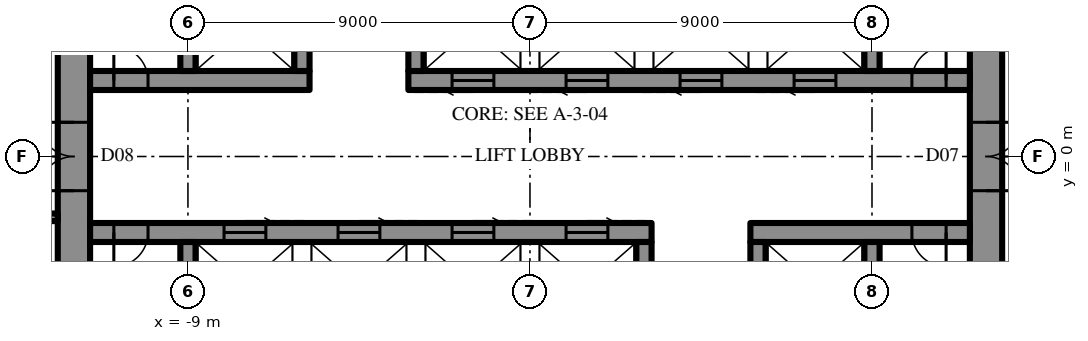
"""IFC4 building model, lengths in metres.
Left out: names, types, materials, properties, quantities, classifications, styles, units other than length and angle.
Written with IfcOpenShell. Run it as: python <this file> out.ifc"""

import sys

from ifc_helpers import new_model, si_unit, direction, frame, frame_2d, origin, place, context, subcontext, project, spatial, rectangle, extrude, element, fill, save


model = new_model("IFC4")
c1 = context("Model", 3, precision=1e-05, world=origin(), true_north=direction((0.0, 1.0)))
c2 = subcontext(c1, "Body", "Model", "MODEL_VIEW")
j1 = project(units=[si_unit("LENGTHUNIT", "METRE"), si_unit("PLANEANGLEUNIT", "RADIAN")], contexts=[c1])
p1 = place(None, origin())
s1 = spatial("IfcSite", under=j1, at=p1, CompositionType="ELEMENT")
p2 = place(p1, origin())
s2 = spatial("IfcBuilding", under=s1, at=p2, CompositionType="ELEMENT")
p3 = place(p2, frame((0.0, 0.0, 353.5)))
s3 = spatial("IfcBuildingStorey", under=s2, at=p3, CompositionType="ELEMENT", Elevation=353.5)
p4 = place(p3, frame((12.0, -10.7, 0.0), z_axis=(0.0, 0.0, 1.0), x_axis=(0.0, 1.0, 0.0)))
e1 = element("IfcWall", 1, at=p4, inside=s3, PredefinedType="SHEAR", context=c2, shape_type="SweptSolid", body=[
    extrude(rectangle(XDim=21.4, YDim=0.85, at=frame_2d((10.7, 0.0))), origin(), (0.0, 0.0, 1.0), 4.2),
])
p5 = place(p4, frame((9.8, 0.0, 0.0)))
e2 = element("IfcOpeningElement", 2, at=p5, cuts=e1, PredefinedType="OPENING", context=c2, shape_type="SweptSolid", body=[
    extrude(rectangle(XDim=1.8, YDim=2.4, at=frame_2d((0.9, 1.2))), frame((0.0, 0.435, 0.0), z_axis=(0.0, -1.0, 0.0), x_axis=(1.0, 0.0, 0.0)), (0.0, 0.0, 1.0), 0.87),
])
p6 = place(p3, frame((-12.0, 10.7, 0.0), z_axis=(0.0, 0.0, 1.0), x_axis=(0.0, -1.0, 0.0)))
e3 = element("IfcWall", 3, at=p6, inside=s3, PredefinedType="SHEAR", context=c2, shape_type="SweptSolid", body=[
    extrude(rectangle(XDim=21.4, YDim=0.85, at=frame_2d((10.7, 0.0))), origin(), (0.0, 0.0, 1.0), 4.2),
])
p7 = place(p6, frame((9.8, 0.0, 0.0)))
e4 = element("IfcOpeningElement", 4, at=p7, cuts=e3, PredefinedType="OPENING", context=c2, shape_type="SweptSolid", body=[
    extrude(rectangle(XDim=1.8, YDim=2.4, at=frame_2d((0.9, 1.2))), frame((0.0, 0.435, 0.0), z_axis=(0.0, -1.0, 0.0), x_axis=(1.0, 0.0, 0.0)), (0.0, 0.0, 1.0), 0.87),
])
p8 = place(p3, frame((-11.575, 2.0, 0.0), z_axis=(0.0, 0.0, 1.0), x_axis=(1.0, 0.0, 0.0)))
e5 = element("IfcWall", 5, at=p8, inside=s3, PredefinedType="SHEAR", context=c2, shape_type="SweptSolid", body=[
    extrude(rectangle(XDim=5.775, YDim=0.5, at=frame_2d((2.887, 0.0))), origin(), (0.0, 0.0, 1.0), 4.2),
])
p9 = place(p8, frame((0.625, 0.0, 0.0)))
e6 = element("IfcOpeningElement", 6, at=p9, cuts=e5, PredefinedType="OPENING", context=c2, shape_type="SweptSolid", body=[
    extrude(rectangle(XDim=0.9, YDim=2.2, at=frame_2d((0.45, 1.1))), frame((0.0, 0.26, 0.0), z_axis=(0.0, -1.0, 0.0), x_axis=(1.0, 0.0, 0.0)), (0.0, 0.0, 1.0), 0.52),
])
p10 = place(p3, frame((-3.2, 2.0, 0.0), z_axis=(0.0, 0.0, 1.0), x_axis=(1.0, 0.0, 0.0)))
e7 = element("IfcWall", 7, at=p10, inside=s3, PredefinedType="SHEAR", context=c2, shape_type="SweptSolid", body=[
    extrude(rectangle(XDim=14.775, YDim=0.5, at=frame_2d((7.387, 0.0))), origin(), (0.0, 0.0, 1.0), 4.2),
])
p11 = place(p10, frame((13.25, 0.0, 0.0)))
e8 = element("IfcOpeningElement", 8, at=p11, cuts=e7, PredefinedType="OPENING", context=c2, shape_type="SweptSolid", body=[
    extrude(rectangle(XDim=0.9, YDim=2.2, at=frame_2d((0.45, 1.1))), frame((0.0, 0.26, 0.0), z_axis=(0.0, -1.0, 0.0), x_axis=(1.0, 0.0, 0.0)), (0.0, 0.0, 1.0), 0.52),
])
p12 = place(p10, frame((1.15, 0.0, 0.0)))
e9 = element("IfcOpeningElement", 9, at=p12, cuts=e7, PredefinedType="OPENING", context=c2, shape_type="SweptSolid", body=[
    extrude(rectangle(XDim=1.1, YDim=2.2, at=frame_2d((0.55, 1.1))), frame((0.0, 0.26, 0.0), z_axis=(0.0, -1.0, 0.0), x_axis=(1.0, 0.0, 0.0)), (0.0, 0.0, 1.0), 0.52),
])
p13 = place(p10, frame((4.15, 0.0, 0.0)))
e10 = element("IfcOpeningElement", 10, at=p13, cuts=e7, PredefinedType="OPENING", context=c2, shape_type="SweptSolid", body=[
    extrude(rectangle(XDim=1.1, YDim=2.2, at=frame_2d((0.55, 1.1))), frame((0.0, 0.26, 0.0), z_axis=(0.0, -1.0, 0.0), x_axis=(1.0, 0.0, 0.0)), (0.0, 0.0, 1.0), 0.52),
])
p14 = place(p10, frame((7.15, 0.0, 0.0)))
e11 = element("IfcOpeningElement", 11, at=p14, cuts=e7, PredefinedType="OPENING", context=c2, shape_type="SweptSolid", body=[
    extrude(rectangle(XDim=1.1, YDim=2.2, at=frame_2d((0.55, 1.1))), frame((0.0, 0.26, 0.0), z_axis=(0.0, -1.0, 0.0), x_axis=(1.0, 0.0, 0.0)), (0.0, 0.0, 1.0), 0.52),
])
p15 = place(p10, frame((10.15, 0.0, 0.0)))
e12 = element("IfcOpeningElement", 12, at=p15, cuts=e7, PredefinedType="OPENING", context=c2, shape_type="SweptSolid", body=[
    extrude(rectangle(XDim=1.1, YDim=2.2, at=frame_2d((0.55, 1.1))), frame((0.0, 0.26, 0.0), z_axis=(0.0, -1.0, 0.0), x_axis=(1.0, 0.0, 0.0)), (0.0, 0.0, 1.0), 0.52),
])
for number, where, z_axis, x_axis in (
    (13, (-9.0, 2.25, 0.0), (0.0, 0.0, 1.0), (0.0, 1.0, 0.0)),
    (14, (-6.0, 2.25, 0.0), (0.0, 0.0, 1.0), (0.0, 1.0, 0.0)),
    (15, (-3.0, 2.25, 0.0), (0.0, 0.0, 1.0), (0.0, 1.0, 0.0)),
    (16, (9.0, 2.25, 0.0), (0.0, 0.0, 1.0), (0.0, 1.0, 0.0)),
):
    element("IfcWall", number, at=place(p3, frame(where, z_axis=z_axis, x_axis=x_axis)), inside=s3, PredefinedType="SHEAR", context=c2, shape_type="SweptSolid", body=[
        extrude(rectangle(XDim=2.3, YDim=0.4, at=frame_2d((1.15, 0.0))), origin(), (0.0, 0.0, 1.0), 4.2),
    ])
p16 = place(p3, frame((11.575, -2.0, 0.0), z_axis=(0.0, 0.0, 1.0), x_axis=(-1.0, 0.0, 0.0)))
e17 = element("IfcWall", 17, at=p16, inside=s3, PredefinedType="SHEAR", context=c2, shape_type="SweptSolid", body=[
    extrude(rectangle(XDim=5.775, YDim=0.5, at=frame_2d((2.887, 0.0))), origin(), (0.0, 0.0, 1.0), 4.2),
])
p17 = place(p16, frame((0.625, 0.0, 0.0)))
e18 = element("IfcOpeningElement", 18, at=p17, cuts=e17, PredefinedType="OPENING", context=c2, shape_type="SweptSolid", body=[
    extrude(rectangle(XDim=0.9, YDim=2.2, at=frame_2d((0.45, 1.1))), frame((0.0, 0.26, 0.0), z_axis=(0.0, -1.0, 0.0), x_axis=(1.0, 0.0, 0.0)), (0.0, 0.0, 1.0), 0.52),
])
p18 = place(p3, frame((3.2, -2.0, 0.0), z_axis=(0.0, 0.0, 1.0), x_axis=(-1.0, 0.0, 0.0)))
e19 = element("IfcWall", 19, at=p18, inside=s3, PredefinedType="SHEAR", context=c2, shape_type="SweptSolid", body=[
    extrude(rectangle(XDim=14.775, YDim=0.5, at=frame_2d((7.387, 0.0))), origin(), (0.0, 0.0, 1.0), 4.2),
])
p19 = place(p18, frame((13.25, 0.0, 0.0)))
e20 = element("IfcOpeningElement", 20, at=p19, cuts=e19, PredefinedType="OPENING", context=c2, shape_type="SweptSolid", body=[
    extrude(rectangle(XDim=0.9, YDim=2.2, at=frame_2d((0.45, 1.1))), frame((0.0, 0.26, 0.0), z_axis=(0.0, -1.0, 0.0), x_axis=(1.0, 0.0, 0.0)), (0.0, 0.0, 1.0), 0.52),
])
p20 = place(p18, frame((1.15, 0.0, 0.0)))
e21 = element("IfcOpeningElement", 21, at=p20, cuts=e19, PredefinedType="OPENING", context=c2, shape_type="SweptSolid", body=[
    extrude(rectangle(XDim=1.1, YDim=2.2, at=frame_2d((0.55, 1.1))), frame((0.0, 0.26, 0.0), z_axis=(0.0, -1.0, 0.0), x_axis=(1.0, 0.0, 0.0)), (0.0, 0.0, 1.0), 0.52),
])
p21 = place(p18, frame((4.15, 0.0, 0.0)))
e22 = element("IfcOpeningElement", 22, at=p21, cuts=e19, PredefinedType="OPENING", context=c2, shape_type="SweptSolid", body=[
    extrude(rectangle(XDim=1.1, YDim=2.2, at=frame_2d((0.55, 1.1))), frame((0.0, 0.26, 0.0), z_axis=(0.0, -1.0, 0.0), x_axis=(1.0, 0.0, 0.0)), (0.0, 0.0, 1.0), 0.52),
])
p22 = place(p18, frame((7.15, 0.0, 0.0)))
e23 = element("IfcOpeningElement", 23, at=p22, cuts=e19, PredefinedType="OPENING", context=c2, shape_type="SweptSolid", body=[
    extrude(rectangle(XDim=1.1, YDim=2.2, at=frame_2d((0.55, 1.1))), frame((0.0, 0.26, 0.0), z_axis=(0.0, -1.0, 0.0), x_axis=(1.0, 0.0, 0.0)), (0.0, 0.0, 1.0), 0.52),
])
p23 = place(p18, frame((10.15, 0.0, 0.0)))
e24 = element("IfcOpeningElement", 24, at=p23, cuts=e19, PredefinedType="OPENING", context=c2, shape_type="SweptSolid", body=[
    extrude(rectangle(XDim=1.1, YDim=2.2, at=frame_2d((0.55, 1.1))), frame((0.0, 0.26, 0.0), z_axis=(0.0, -1.0, 0.0), x_axis=(1.0, 0.0, 0.0)), (0.0, 0.0, 1.0), 0.52),
])
for number, where, z_axis, x_axis in (
    (25, (9.0, -2.25, 0.0), (0.0, 0.0, 1.0), (0.0, -1.0, 0.0)),
    (26, (6.0, -2.25, 0.0), (0.0, 0.0, 1.0), (0.0, -1.0, 0.0)),
    (27, (3.0, -2.25, 0.0), (0.0, 0.0, 1.0), (0.0, -1.0, 0.0)),
    (28, (-9.0, -2.25, 0.0), (0.0, 0.0, 1.0), (0.0, -1.0, 0.0)),
):
    element("IfcWall", number, at=place(p3, frame(where, z_axis=z_axis, x_axis=x_axis)), inside=s3, PredefinedType="SHEAR", context=c2, shape_type="SweptSolid", body=[
        extrude(rectangle(XDim=2.3, YDim=0.4, at=frame_2d((1.15, 0.0))), origin(), (0.0, 0.0, 1.0), 4.2),
    ])
p24 = place(p3, frame((-12.425, -1.6, 0.0), z_axis=(0.0, 0.0, 1.0), x_axis=(-1.0, 0.0, 0.0)))
e29 = element("IfcWall", 29, at=p24, inside=s3, PredefinedType="PARTITIONING", context=c2, shape_type="SweptSolid", body=[
    extrude(rectangle(XDim=16.5, YDim=0.2, at=frame_2d((8.25, 0.0))), origin(), (0.0, 0.0, 1.0), 4.0),
])
p25 = place(p24, frame((1.15, 0.0, 0.0)))
e30 = element("IfcOpeningElement", 30, at=p25, cuts=e29, PredefinedType="OPENING", context=c2, shape_type="SweptSolid", body=[
    extrude(rectangle(XDim=1.0, YDim=2.2, at=frame_2d((0.5, 1.1))), frame((0.0, 0.11, 0.0), z_axis=(0.0, -1.0, 0.0), x_axis=(1.0, 0.0, 0.0)), (0.0, 0.0, 1.0), 0.22),
])
p26 = place(p5, frame((1.8, 0.0, 0.0), z_axis=(0.0, 0.0, 1.0), x_axis=(-1.0, 0.0, 0.0)))
e31 = element("IfcDoor", 31, at=p26, inside=s3, OperationType="DOUBLE_DOOR_SINGLE_SWING", PredefinedType="DOOR", context=c2, shape_type="SweptSolid", body=[
    extrude(rectangle(XDim=1.8, YDim=2.4, at=frame_2d((0.9, 1.2))), frame((0.0, 0.025, 0.0), z_axis=(0.0, -1.0, 0.0), x_axis=(1.0, 0.0, 0.0)), (0.0, 0.0, 1.0), 0.05),
])
fill(e2, e31)
p27 = place(p7, frame((1.8, 0.0, 0.0), z_axis=(0.0, 0.0, 1.0), x_axis=(-1.0, 0.0, 0.0)))
e32 = element("IfcDoor", 32, at=p27, inside=s3, OperationType="DOUBLE_DOOR_SINGLE_SWING", PredefinedType="DOOR", context=c2, shape_type="SweptSolid", body=[
    extrude(rectangle(XDim=1.8, YDim=2.4, at=frame_2d((0.9, 1.2))), frame((0.0, 0.025, 0.0), z_axis=(0.0, -1.0, 0.0), x_axis=(1.0, 0.0, 0.0)), (0.0, 0.0, 1.0), 0.05),
])
fill(e4, e32)
p28 = place(p9, origin())
e33 = element("IfcDoor", 33, at=p28, inside=s3, OperationType="SINGLE_SWING_RIGHT", PredefinedType="DOOR", context=c2, shape_type="SweptSolid", body=[
    extrude(rectangle(XDim=0.9, YDim=2.2, at=frame_2d((0.45, 1.1))), frame((0.0, 0.025, 0.0), z_axis=(0.0, -1.0, 0.0), x_axis=(1.0, 0.0, 0.0)), (0.0, 0.0, 1.0), 0.05),
])
fill(e6, e33)
p29 = place(p11, origin())
e34 = element("IfcDoor", 34, at=p29, inside=s3, OperationType="SINGLE_SWING_LEFT", PredefinedType="DOOR", context=c2, shape_type="SweptSolid", body=[
    extrude(rectangle(XDim=0.9, YDim=2.2, at=frame_2d((0.45, 1.1))), frame((0.0, 0.025, 0.0), z_axis=(0.0, -1.0, 0.0), x_axis=(1.0, 0.0, 0.0)), (0.0, 0.0, 1.0), 0.05),
])
fill(e8, e34)
p30 = place(p17, origin())
e35 = element("IfcDoor", 35, at=p30, inside=s3, OperationType="SINGLE_SWING_RIGHT", PredefinedType="DOOR", context=c2, shape_type="SweptSolid", body=[
    extrude(rectangle(XDim=0.9, YDim=2.2, at=frame_2d((0.45, 1.1))), frame((0.0, 0.025, 0.0), z_axis=(0.0, -1.0, 0.0), x_axis=(1.0, 0.0, 0.0)), (0.0, 0.0, 1.0), 0.05),
])
fill(e18, e35)
p31 = place(p19, origin())
e36 = element("IfcDoor", 36, at=p31, inside=s3, OperationType="SINGLE_SWING_LEFT", PredefinedType="DOOR", context=c2, shape_type="SweptSolid", body=[
    extrude(rectangle(XDim=0.9, YDim=2.2, at=frame_2d((0.45, 1.1))), frame((0.0, 0.025, 0.0), z_axis=(0.0, -1.0, 0.0), x_axis=(1.0, 0.0, 0.0)), (0.0, 0.0, 1.0), 0.05),
])
fill(e20, e36)
p32 = place(p12, frame((1.1, 0.0, 0.0), z_axis=(0.0, 0.0, 1.0), x_axis=(-1.0, 0.0, 0.0)))
e37 = element("IfcDoor", 37, at=p32, inside=s3, OperationType="SLIDING_TO_LEFT", PredefinedType="DOOR", context=c2, shape_type="SweptSolid", body=[
    extrude(rectangle(XDim=1.1, YDim=2.2, at=frame_2d((0.55, 1.1))), frame((0.0, 0.025, 0.0), z_axis=(0.0, -1.0, 0.0), x_axis=(1.0, 0.0, 0.0)), (0.0, 0.0, 1.0), 0.05),
])
fill(e9, e37)
p33 = place(p13, frame((1.1, 0.0, 0.0), z_axis=(0.0, 0.0, 1.0), x_axis=(-1.0, 0.0, 0.0)))
e38 = element("IfcDoor", 38, at=p33, inside=s3, OperationType="SLIDING_TO_LEFT", PredefinedType="DOOR", context=c2, shape_type="SweptSolid", body=[
    extrude(rectangle(XDim=1.1, YDim=2.2, at=frame_2d((0.55, 1.1))), frame((0.0, 0.025, 0.0), z_axis=(0.0, -1.0, 0.0), x_axis=(1.0, 0.0, 0.0)), (0.0, 0.0, 1.0), 0.05),
])
fill(e10, e38)
p34 = place(p14, frame((1.1, 0.0, 0.0), z_axis=(0.0, 0.0, 1.0), x_axis=(-1.0, 0.0, 0.0)))
e39 = element("IfcDoor", 39, at=p34, inside=s3, OperationType="SLIDING_TO_LEFT", PredefinedType="DOOR", context=c2, shape_type="SweptSolid", body=[
    extrude(rectangle(XDim=1.1, YDim=2.2, at=frame_2d((0.55, 1.1))), frame((0.0, 0.025, 0.0), z_axis=(0.0, -1.0, 0.0), x_axis=(1.0, 0.0, 0.0)), (0.0, 0.0, 1.0), 0.05),
])
fill(e11, e39)
p35 = place(p15, frame((1.1, 0.0, 0.0), z_axis=(0.0, 0.0, 1.0), x_axis=(-1.0, 0.0, 0.0)))
e40 = element("IfcDoor", 40, at=p35, inside=s3, OperationType="SLIDING_TO_LEFT", PredefinedType="DOOR", context=c2, shape_type="SweptSolid", body=[
    extrude(rectangle(XDim=1.1, YDim=2.2, at=frame_2d((0.55, 1.1))), frame((0.0, 0.025, 0.0), z_axis=(0.0, -1.0, 0.0), x_axis=(1.0, 0.0, 0.0)), (0.0, 0.0, 1.0), 0.05),
])
fill(e12, e40)
p36 = place(p20, frame((1.1, 0.0, 0.0), z_axis=(0.0, 0.0, 1.0), x_axis=(-1.0, 0.0, 0.0)))
e41 = element("IfcDoor", 41, at=p36, inside=s3, OperationType="SLIDING_TO_LEFT", PredefinedType="DOOR", context=c2, shape_type="SweptSolid", body=[
    extrude(rectangle(XDim=1.1, YDim=2.2, at=frame_2d((0.55, 1.1))), frame((0.0, 0.025, 0.0), z_axis=(0.0, -1.0, 0.0), x_axis=(1.0, 0.0, 0.0)), (0.0, 0.0, 1.0), 0.05),
])
fill(e21, e41)
p37 = place(p21, frame((1.1, 0.0, 0.0), z_axis=(0.0, 0.0, 1.0), x_axis=(-1.0, 0.0, 0.0)))
e42 = element("IfcDoor", 42, at=p37, inside=s3, OperationType="SLIDING_TO_LEFT", PredefinedType="DOOR", context=c2, shape_type="SweptSolid", body=[
    extrude(rectangle(XDim=1.1, YDim=2.2, at=frame_2d((0.55, 1.1))), frame((0.0, 0.025, 0.0), z_axis=(0.0, -1.0, 0.0), x_axis=(1.0, 0.0, 0.0)), (0.0, 0.0, 1.0), 0.05),
])
fill(e22, e42)
p38 = place(p22, frame((1.1, 0.0, 0.0), z_axis=(0.0, 0.0, 1.0), x_axis=(-1.0, 0.0, 0.0)))
e43 = element("IfcDoor", 43, at=p38, inside=s3, OperationType="SLIDING_TO_LEFT", PredefinedType="DOOR", context=c2, shape_type="SweptSolid", body=[
    extrude(rectangle(XDim=1.1, YDim=2.2, at=frame_2d((0.55, 1.1))), frame((0.0, 0.025, 0.0), z_axis=(0.0, -1.0, 0.0), x_axis=(1.0, 0.0, 0.0)), (0.0, 0.0, 1.0), 0.05),
])
fill(e23, e43)
p39 = place(p23, frame((1.1, 0.0, 0.0), z_axis=(0.0, 0.0, 1.0), x_axis=(-1.0, 0.0, 0.0)))
e44 = element("IfcDoor", 44, at=p39, inside=s3, OperationType="SLIDING_TO_LEFT", PredefinedType="DOOR", context=c2, shape_type="SweptSolid", body=[
    extrude(rectangle(XDim=1.1, YDim=2.2, at=frame_2d((0.55, 1.1))), frame((0.0, 0.025, 0.0), z_axis=(0.0, -1.0, 0.0), x_axis=(1.0, 0.0, 0.0)), (0.0, 0.0, 1.0), 0.05),
])
fill(e24, e44)
save(model, sys.argv[1])
